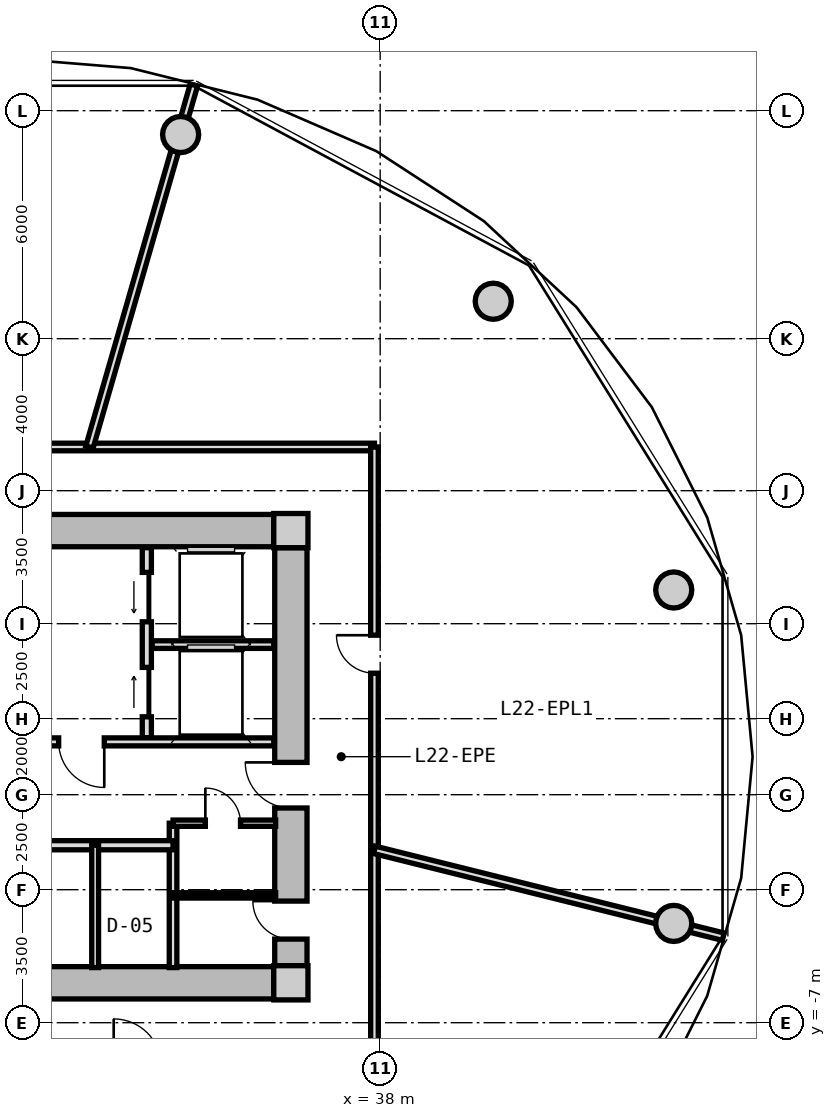
"""IFC4 building model, lengths in metres.
Left out: names, types, materials, properties, quantities, classifications, styles, units other than length and angle.
Written with IfcOpenShell. Run it as: python <this file> out.ifc"""

import sys

from ifc_helpers import new_model, si_unit, direction, frame, frame_2d, origin, origin_2d, place, context, subcontext, project, spatial, rectangle, circle, extrude, source, transform, mapped, element, fill, save


model = new_model("IFC4")
c1 = context("Model", 3, precision=1e-05, world=origin(), true_north=direction((0.0, 1.0)))
c2 = subcontext(c1, "Body", "Model", "MODEL_VIEW")
j1 = project(units=[si_unit("LENGTHUNIT", "METRE"), si_unit("PLANEANGLEUNIT", "RADIAN")], contexts=[c1])
p1 = place(None, origin())
s1 = spatial("IfcSite", under=j1, at=p1, CompositionType="ELEMENT")
p2 = place(p1, origin())
s2 = spatial("IfcBuilding", under=s1, at=p2, CompositionType="ELEMENT")
p3 = place(p2, frame((0.0, 0.0, 73.45)))
s3 = spatial("IfcBuildingStorey", under=s2, at=p3, CompositionType="ELEMENT", Elevation=73.45)
m1 = source(origin(), c2, "Body", "SweptSolid", [
    extrude(rectangle(XDim=0.9, YDim=0.9, at=origin_2d()), origin(), (0.0, 0.0, 1.0), 4.5),
])
for number, where, z_axis, x_axis in (
    (1, (35.65, -5.95, 0.0), (0.0, 0.0, 1.0), (1.0, 0.0, 0.0)),
    (2, (35.65, 5.95, 0.0), (0.0, 0.0, 1.0), (1.0, 0.0, 0.0)),
):
    element("IfcColumn", number, at=place(p3, frame(where, z_axis=z_axis, x_axis=x_axis)), inside=s3, PredefinedType="COLUMN", context=c2, shape_type="MappedRepresentation", body=[
        mapped(m1, transform((0.0, 0.0, 0.0), x_axis=(1.0, 0.0, 0.0), y_axis=(0.0, 1.0, 0.0), z_axis=(0.0, 0.0, 1.0), scale=1.0)),
    ])
m2 = source(origin(), c2, "Body", "SweptSolid", [
    extrude(rectangle(XDim=14.4, YDim=0.85, at=frame_2d((7.2, 0.0))), origin(), (0.0, 0.0, 1.0), 4.08),
])
for number, where, z_axis, x_axis in (
    (3, (20.8, 5.95, 0.0), (0.0, 0.0, 1.0), (1.0, 0.0, 0.0)),
    (4, (35.2, -5.95, 0.0), (0.0, 0.0, 1.0), (-1.0, 0.0, 0.0)),
):
    element("IfcWall", number, at=place(p3, frame(where, z_axis=z_axis, x_axis=x_axis)), inside=s3, PredefinedType="SHEAR", context=c2, shape_type="MappedRepresentation", body=[
        mapped(m2, transform((0.0, 0.0, 0.0), x_axis=(1.0, 0.0, 0.0), y_axis=(0.0, 1.0, 0.0), z_axis=(0.0, 0.0, 1.0), scale=1.0)),
    ])
m3 = source(origin(), c2, "Body", "SweptSolid", [
    extrude(rectangle(XDim=11.0, YDim=0.85, at=frame_2d((5.5, 0.0))), origin(), (0.0, 0.0, 1.0), 4.08),
])
p4 = place(p3, frame((35.65, 5.5, 0.0), z_axis=(0.0, 0.0, 1.0), x_axis=(0.0, -1.0, 0.0)))
e5 = element("IfcWall", 5, at=p4, inside=s3, PredefinedType="SHEAR", context=c2, shape_type="MappedRepresentation", body=[
    mapped(m3, transform((0.0, 0.0, 0.0), x_axis=(1.0, 0.0, 0.0), y_axis=(0.0, 1.0, 0.0), z_axis=(0.0, 0.0, 1.0), scale=1.0)),
])
p5 = place(p4, frame((5.65, 0.0, 0.0)))
e6 = element("IfcOpeningElement", 6, at=p5, cuts=e5, PredefinedType="OPENING", context=c2, shape_type="SweptSolid", body=[
    extrude(rectangle(XDim=1.2, YDim=2.15, at=frame_2d((0.6, 1.075))), frame((0.0, 0.435, 0.0), z_axis=(0.0, -1.0, 0.0), x_axis=(1.0, 0.0, 0.0)), (0.0, 0.0, 1.0), 0.87),
])
p6 = place(p4, frame((9.3, 0.0, 0.0)))
e7 = element("IfcOpeningElement", 7, at=p6, cuts=e5, PredefinedType="OPENING", context=c2, shape_type="SweptSolid", body=[
    extrude(rectangle(XDim=1.0, YDim=2.1, at=frame_2d((0.5, 1.05))), frame((0.0, 0.435, 0.0), z_axis=(0.0, -1.0, 0.0), x_axis=(1.0, 0.0, 0.0)), (0.0, 0.0, 1.0), 0.87),
])
m4 = source(origin(), c2, "Body", "SweptSolid", [
    extrude(circle(Radius=0.475, at=origin_2d()), origin(), (0.0, 0.0, 1.0), 4.08),
])
for number, where, z_axis, x_axis in (
    (8, (45.725, 4.387, 0.0), (0.0, 0.0, 1.0), (1.0, 0.0, 0.0)),
    (9, (40.975, 11.985, 0.0), (0.0, 0.0, 1.0), (1.0, 0.0, 0.0)),
    (10, (32.749, 16.373, 0.0), (0.0, 0.0, 1.0), (1.0, 0.0, 0.0)),
    (11, (45.725, -4.387, 0.0), (0.0, 0.0, 1.0), (1.0, 0.0, 0.0)),
):
    element("IfcColumn", number, at=place(p3, frame(where, z_axis=z_axis, x_axis=x_axis)), inside=s3, PredefinedType="COLUMN", context=c2, shape_type="MappedRepresentation", body=[
        mapped(m4, transform((0.0, 0.0, 0.0), x_axis=(1.0, 0.0, 0.0), y_axis=(0.0, 1.0, 0.0), z_axis=(0.0, 0.0, 1.0), scale=1.0)),
    ])
m5 = source(origin(), c2, "Body", "SweptSolid", [
    extrude(rectangle(XDim=5.0, YDim=0.24, at=frame_2d((2.5, 0.0))), origin(), (0.0, 0.0, 1.0), 4.065),
])
p7 = place(p3, frame((31.86, 0.5, 0.0), z_axis=(0.0, 0.0, 1.0), x_axis=(0.0, 1.0, 0.0)))
e12 = element("IfcWall", 12, at=p7, inside=s3, PredefinedType="PARTITIONING", context=c2, shape_type="MappedRepresentation", body=[
    mapped(m5, transform((0.0, 0.0, 0.0), x_axis=(1.0, 0.0, 0.0), y_axis=(0.0, 1.0, 0.0), z_axis=(0.0, 0.0, 1.0), scale=1.0)),
])
p8 = place(p7, frame((3.05, 0.0, 0.0)))
e13 = element("IfcOpeningElement", 13, at=p8, cuts=e12, PredefinedType="OPENING", context=c2, shape_type="SweptSolid", body=[
    extrude(rectangle(XDim=1.3, YDim=2.2, at=frame_2d((0.65, 1.1))), frame((0.0, 0.13, 0.0), z_axis=(0.0, -1.0, 0.0), x_axis=(1.0, 0.0, 0.0)), (0.0, 0.0, 1.0), 0.26),
])
p9 = place(p7, frame((0.55, 0.0, 0.0)))
e14 = element("IfcOpeningElement", 14, at=p9, cuts=e12, PredefinedType="OPENING", context=c2, shape_type="SweptSolid", body=[
    extrude(rectangle(XDim=1.3, YDim=2.2, at=frame_2d((0.65, 1.1))), frame((0.0, 0.13, 0.0), z_axis=(0.0, -1.0, 0.0), x_axis=(1.0, 0.0, 0.0)), (0.0, 0.0, 1.0), 0.26),
])
m6 = source(origin(), c2, "Body", "SweptSolid", [
    extrude(rectangle(XDim=3.2, YDim=0.2, at=frame_2d((1.6, 0.0))), origin(), (0.0, 0.0, 1.0), 4.065),
])
p10 = place(p3, frame((32.0, 2.95, 0.0), z_axis=(0.0, 0.0, 1.0), x_axis=(1.0, 0.0, 0.0)))
e15 = element("IfcWall", 15, at=p10, inside=s3, PredefinedType="PARTITIONING", context=c2, shape_type="MappedRepresentation", body=[
    mapped(m6, transform((0.0, 0.0, 0.0), x_axis=(1.0, 0.0, 0.0), y_axis=(0.0, 1.0, 0.0), z_axis=(0.0, 0.0, 1.0), scale=1.0)),
])
m7 = source(origin(), c2, "Body", "SweptSolid", [
    extrude(rectangle(XDim=6.66, YDim=0.21, at=frame_2d((3.33, 0.0))), origin(), (0.0, 0.0, 1.0), 4.065),
])
p11 = place(p3, frame((28.54, 0.39, 0.0), z_axis=(0.0, 0.0, 1.0), x_axis=(1.0, 0.0, 0.0)))
e16 = element("IfcWall", 16, at=p11, inside=s3, PredefinedType="PARTITIONING", context=c2, shape_type="MappedRepresentation", body=[
    mapped(m7, transform((0.0, 0.0, 0.0), x_axis=(1.0, 0.0, 0.0), y_axis=(0.0, 1.0, 0.0), z_axis=(0.0, 0.0, 1.0), scale=1.0)),
])
p12 = place(p11, frame((1.0, 0.0, 0.0)))
e17 = element("IfcOpeningElement", 17, at=p12, cuts=e16, PredefinedType="OPENING", context=c2, shape_type="SweptSolid", body=[
    extrude(rectangle(XDim=1.2, YDim=2.15, at=frame_2d((0.6, 1.075))), frame((0.0, 0.115, 0.0), z_axis=(0.0, -1.0, 0.0), x_axis=(1.0, 0.0, 0.0)), (0.0, 0.0, 1.0), 0.23),
])
m8 = source(origin(), c2, "Body", "SweptSolid", [
    extrude(rectangle(XDim=3.8, YDim=0.2, at=frame_2d((1.9, 0.0))), origin(), (0.0, 0.0, 1.0), 4.065),
])
p13 = place(p3, frame((32.55, -5.55, 0.0), z_axis=(0.0, 0.0, 1.0), x_axis=(0.0, 1.0, 0.0)))
e18 = element("IfcWall", 18, at=p13, inside=s3, PredefinedType="PARTITIONING", context=c2, shape_type="MappedRepresentation", body=[
    mapped(m8, transform((0.0, 0.0, 0.0), x_axis=(1.0, 0.0, 0.0), y_axis=(0.0, 1.0, 0.0), z_axis=(0.0, 0.0, 1.0), scale=1.0)),
])
m9 = source(origin(), c2, "Body", "SweptSolid", [
    extrude(rectangle(XDim=4.13, YDim=0.24, at=frame_2d((2.065, 0.0))), origin(), (0.0, 0.0, 1.0), 4.065),
])
p14 = place(p3, frame((28.42, -2.33, 0.0), z_axis=(0.0, 0.0, 1.0), x_axis=(1.0, 0.0, 0.0)))
e19 = element("IfcWall", 19, at=p14, inside=s3, PredefinedType="PARTITIONING", context=c2, shape_type="MappedRepresentation", body=[
    mapped(m9, transform((0.0, 0.0, 0.0), x_axis=(1.0, 0.0, 0.0), y_axis=(0.0, 1.0, 0.0), z_axis=(0.0, 0.0, 1.0), scale=1.0)),
])
m10 = source(origin(), c2, "Body", "SweptSolid", [
    extrude(rectangle(XDim=3.22, YDim=0.18, at=frame_2d((1.61, 0.0))), origin(), (0.0, 0.0, 1.0), 4.065),
])
p15 = place(p3, frame((30.5, -5.55, 0.0), z_axis=(0.0, 0.0, 1.0), x_axis=(0.0, 1.0, 0.0)))
e20 = element("IfcWall", 20, at=p15, inside=s3, PredefinedType="PARTITIONING", context=c2, shape_type="MappedRepresentation", body=[
    mapped(m10, transform((0.0, 0.0, 0.0), x_axis=(1.0, 0.0, 0.0), y_axis=(0.0, 1.0, 0.0), z_axis=(0.0, 0.0, 1.0), scale=1.0)),
])
m11 = source(origin(), c2, "Body", "SweptSolid", [
    extrude(rectangle(XDim=2.7, YDim=0.165, at=frame_2d((1.35, 0.0))), origin(), (0.0, 0.0, 1.0), 4.065),
])
p16 = place(p3, frame((32.55, -1.75, 0.0), z_axis=(0.0, 0.0, 1.0), x_axis=(1.0, 0.0, 0.0)))
e21 = element("IfcWall", 21, at=p16, inside=s3, PredefinedType="PARTITIONING", context=c2, shape_type="MappedRepresentation", body=[
    mapped(m11, transform((0.0, 0.0, 0.0), x_axis=(1.0, 0.0, 0.0), y_axis=(0.0, 1.0, 0.0), z_axis=(0.0, 0.0, 1.0), scale=1.0)),
])
p17 = place(p16, frame((0.85, 0.0, 0.0)))
e22 = element("IfcOpeningElement", 22, at=p17, cuts=e21, PredefinedType="OPENING", context=c2, shape_type="SweptSolid", body=[
    extrude(rectangle(XDim=0.925, YDim=2.1, at=frame_2d((0.462, 1.05))), frame((0.0, 0.093, 0.0), z_axis=(0.0, -1.0, 0.0), x_axis=(1.0, 0.0, 0.0)), (0.0, 0.0, 1.0), 0.185),
])
m12 = source(origin(), c2, "Body", "SweptSolid", [
    extrude(rectangle(XDim=2.7, YDim=0.14, at=frame_2d((1.35, 0.0))), origin(), (0.0, 0.0, 1.0), 4.065),
])
p18 = place(p3, frame((32.55, -3.65, 0.0), z_axis=(0.0, 0.0, 1.0), x_axis=(1.0, 0.0, 0.0)))
e23 = element("IfcWall", 23, at=p18, inside=s3, PredefinedType="PARTITIONING", context=c2, shape_type="MappedRepresentation", body=[
    mapped(m12, transform((0.0, 0.0, 0.0), x_axis=(1.0, 0.0, 0.0), y_axis=(0.0, 1.0, 0.0), z_axis=(0.0, 0.0, 1.0), scale=1.0)),
])
m13 = source(origin(), c2, "Body", "SweptSolid", [
    extrude(rectangle(XDim=19.7, YDim=0.2, at=frame_2d((9.85, 0.0))), origin(), (0.0, 0.0, 1.0), 4.065),
])
p19 = place(p3, frame((18.15, 8.15, 0.0), z_axis=(0.0, 0.0, 1.0), x_axis=(1.0, 0.0, 0.0)))
e24 = element("IfcWall", 24, at=p19, inside=s3, PredefinedType="PARTITIONING", context=c2, shape_type="MappedRepresentation", body=[
    mapped(m13, transform((0.0, 0.0, 0.0), x_axis=(1.0, 0.0, 0.0), y_axis=(0.0, 1.0, 0.0), z_axis=(0.0, 0.0, 1.0), scale=1.0)),
])
p20 = place(p19, frame((5.737, 0.0, 0.0)))
e25 = element("IfcOpeningElement", 25, at=p20, cuts=e24, PredefinedType="OPENING", context=c2, shape_type="SweptSolid", body=[
    extrude(rectangle(XDim=1.0, YDim=2.1, at=frame_2d((0.5, 1.05))), frame((0.0, 0.11, 0.0), z_axis=(0.0, -1.0, 0.0), x_axis=(1.0, 0.0, 0.0)), (0.0, 0.0, 1.0), 0.22),
])
m14 = source(origin(), c2, "Body", "SweptSolid", [
    extrude(rectangle(XDim=16.3, YDim=0.2, at=frame_2d((8.15, 0.0))), origin(), (0.0, 0.0, 1.0), 4.065),
])
p21 = place(p3, frame((37.85, 8.15, 0.0), z_axis=(0.0, 0.0, 1.0), x_axis=(0.0, -1.0, 0.0)))
e26 = element("IfcWall", 26, at=p21, inside=s3, PredefinedType="PARTITIONING", context=c2, shape_type="MappedRepresentation", body=[
    mapped(m14, transform((0.0, 0.0, 0.0), x_axis=(1.0, 0.0, 0.0), y_axis=(0.0, 1.0, 0.0), z_axis=(0.0, 0.0, 1.0), scale=1.0)),
])
p22 = place(p21, frame((4.953, 0.0, 0.0)))
e27 = element("IfcOpeningElement", 27, at=p22, cuts=e26, PredefinedType="OPENING", context=c2, shape_type="SweptSolid", body=[
    extrude(rectangle(XDim=1.0, YDim=2.1, at=frame_2d((0.5, 1.05))), frame((0.0, 0.11, 0.0), z_axis=(0.0, -1.0, 0.0), x_axis=(1.0, 0.0, 0.0)), (0.0, 0.0, 1.0), 0.22),
])
m15 = source(origin(), c2, "Body", "SweptSolid", [
    extrude(rectangle(XDim=9.459, YDim=0.2, at=frame_2d((4.729, 0.0))), origin(), (0.0, 0.0, 1.0), 2.515),
])
p23 = place(p3, frame((37.85, -2.452, 0.0), z_axis=(0.0, 0.0, 1.0), x_axis=(0.970390989268, -0.241539495626, 0.0)))
e28 = element("IfcWall", 28, at=p23, inside=s3, PredefinedType="PARTITIONING", context=c2, shape_type="MappedRepresentation", body=[
    mapped(m15, transform((0.0, 0.0, 0.0), x_axis=(1.0, 0.0, 0.0), y_axis=(0.0, 1.0, 0.0), z_axis=(0.0, 0.0, 1.0), scale=1.0)),
])
m16 = source(origin(), c2, "Body", "SweptSolid", [
    extrude(rectangle(XDim=9.915, YDim=0.2, at=frame_2d((4.958, 0.0))), origin(), (0.0, 0.0, 1.0), 4.065),
])
p24 = place(p3, frame((30.351, 8.15, 0.0), z_axis=(0.0, 0.0, 1.0), x_axis=(0.277136607861, 0.960830526463, 0.0)))
e29 = element("IfcWall", 29, at=p24, inside=s3, PredefinedType="PARTITIONING", context=c2, shape_type="MappedRepresentation", body=[
    mapped(m16, transform((0.0, 0.0, 0.0), x_axis=(1.0, 0.0, 0.0), y_axis=(0.0, 1.0, 0.0), z_axis=(0.0, 0.0, 1.0), scale=1.0)),
])
m17 = source(origin(), c2, "Body", "SweptSolid", [
    extrude(rectangle(XDim=1.3, YDim=2.2, at=frame_2d((0.65, 1.1))), frame((0.0, 0.025, 0.0), z_axis=(0.0, -1.0, 0.0), x_axis=(1.0, 0.0, 0.0)), (0.0, 0.0, 1.0), 0.05),
])
p25 = place(p8, origin())
e30 = element("IfcDoor", 30, at=p25, inside=s3, OperationType="SLIDING_TO_LEFT", PredefinedType="DOOR", context=c2, shape_type="MappedRepresentation", body=[
    mapped(m17, transform((0.0, 0.0, 0.0), x_axis=(1.0, 0.0, 0.0), y_axis=(0.0, 1.0, 0.0), z_axis=(0.0, 0.0, 1.0), scale=1.0)),
])
fill(e13, e30)
p26 = place(p9, origin())
e31 = element("IfcDoor", 31, at=p26, inside=s3, OperationType="SLIDING_TO_RIGHT", PredefinedType="DOOR", context=c2, shape_type="MappedRepresentation", body=[
    mapped(m17, transform((0.0, 0.0, 0.0), x_axis=(1.0, 0.0, 0.0), y_axis=(0.0, 1.0, 0.0), z_axis=(0.0, 0.0, 1.0), scale=1.0)),
])
fill(e14, e31)
m18 = source(origin(), c2, "Body", "SweptSolid", [
    extrude(rectangle(XDim=1.2, YDim=2.15, at=frame_2d((0.6, 1.075))), frame((0.0, 0.025, 0.0), z_axis=(0.0, -1.0, 0.0), x_axis=(1.0, 0.0, 0.0)), (0.0, 0.0, 1.0), 0.05),
])
p27 = place(p12, frame((1.2, 0.0, 0.0), z_axis=(0.0, 0.0, 1.0), x_axis=(-1.0, 0.0, 0.0)))
e32 = element("IfcDoor", 32, at=p27, inside=s3, OperationType="SINGLE_SWING_LEFT", PredefinedType="DOOR", context=c2, shape_type="MappedRepresentation", body=[
    mapped(m18, transform((0.0, 0.0, 0.0), x_axis=(1.0, 0.0, 0.0), y_axis=(0.0, 1.0, 0.0), z_axis=(0.0, 0.0, 1.0), scale=1.0)),
])
fill(e17, e32)
p28 = place(p5, frame((1.2, 0.0, 0.0), z_axis=(0.0, 0.0, 1.0), x_axis=(-1.0, 0.0, 0.0)))
e33 = element("IfcDoor", 33, at=p28, inside=s3, OperationType="SINGLE_SWING_RIGHT", PredefinedType="DOOR", context=c2, shape_type="MappedRepresentation", body=[
    mapped(m18, transform((0.0, 0.0, 0.0), x_axis=(1.0, 0.0, 0.0), y_axis=(0.0, 1.0, 0.0), z_axis=(0.0, 0.0, 1.0), scale=1.0)),
])
fill(e6, e33)
m19 = source(origin(), c2, "Body", "SweptSolid", [
    extrude(rectangle(XDim=0.925, YDim=2.1, at=frame_2d((0.462, 1.05))), frame((0.0, 0.025, 0.0), z_axis=(0.0, -1.0, 0.0), x_axis=(1.0, 0.0, 0.0)), (0.0, 0.0, 1.0), 0.05),
])
p29 = place(p17, origin())
e34 = element("IfcDoor", 34, at=p29, inside=s3, OperationType="SINGLE_SWING_LEFT", PredefinedType="DOOR", context=c2, shape_type="MappedRepresentation", body=[
    mapped(m19, transform((0.0, 0.0, 0.0), x_axis=(1.0, 0.0, 0.0), y_axis=(0.0, 1.0, 0.0), z_axis=(0.0, 0.0, 1.0), scale=1.0)),
])
fill(e22, e34)
m20 = source(origin(), c2, "Body", "SweptSolid", [
    extrude(rectangle(XDim=1.0, YDim=2.1, at=frame_2d((0.5, 1.05))), frame((0.0, 0.025, 0.0), z_axis=(0.0, -1.0, 0.0), x_axis=(1.0, 0.0, 0.0)), (0.0, 0.0, 1.0), 0.05),
])
p30 = place(p6, frame((1.0, 0.0, 0.0), z_axis=(0.0, 0.0, 1.0), x_axis=(-1.0, 0.0, 0.0)))
e35 = element("IfcDoor", 35, at=p30, inside=s3, OperationType="SINGLE_SWING_RIGHT", PredefinedType="DOOR", context=c2, shape_type="MappedRepresentation", body=[
    mapped(m20, transform((0.0, 0.0, 0.0), x_axis=(1.0, 0.0, 0.0), y_axis=(0.0, 1.0, 0.0), z_axis=(0.0, 0.0, 1.0), scale=1.0)),
])
fill(e7, e35)
p31 = place(p22, frame((1.0, 0.0, 0.0), z_axis=(0.0, 0.0, 1.0), x_axis=(-1.0, 0.0, 0.0)))
e36 = element("IfcDoor", 36, at=p31, inside=s3, OperationType="SINGLE_SWING_RIGHT", PredefinedType="DOOR", context=c2, shape_type="MappedRepresentation", body=[
    mapped(m20, transform((0.0, 0.0, 0.0), x_axis=(1.0, 0.0, 0.0), y_axis=(0.0, 1.0, 0.0), z_axis=(0.0, 0.0, 1.0), scale=1.0)),
])
fill(e27, e36)
save(model, sys.argv[1])
